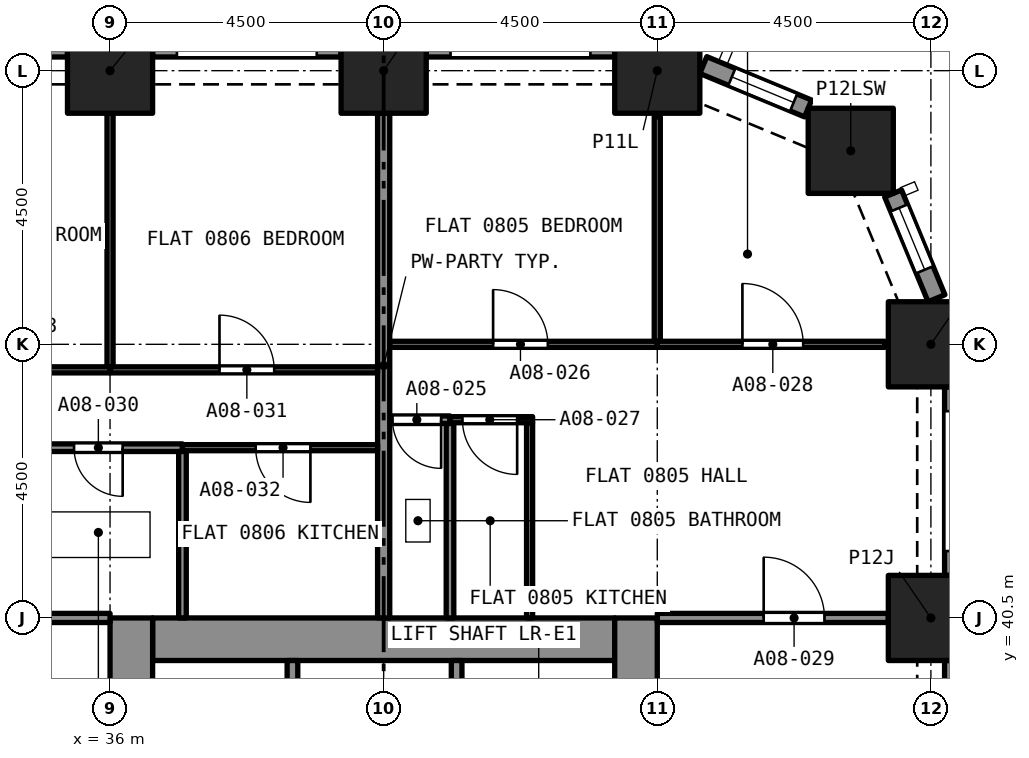
"""IFC4 building model, lengths in metres.
Left out: names, types, materials, properties, quantities, classifications, styles, units other than length and angle.
Written with IfcOpenShell. Run it as: python <this file> out.ifc"""

import sys

from ifc_helpers import new_model, si_unit, direction, frame, frame_2d, origin, origin_2d, place, context, subcontext, project, spatial, rectangle, extrude, element, fill, save


model = new_model("IFC4")
c1 = context("Model", 3, precision=1e-05, world=origin(), true_north=direction((0.0, 1.0)))
c2 = subcontext(c1, "Body", "Model", "MODEL_VIEW")
j1 = project(units=[si_unit("LENGTHUNIT", "METRE"), si_unit("PLANEANGLEUNIT", "RADIAN")], contexts=[c1])
p1 = place(None, origin())
s1 = spatial("IfcSite", under=j1, at=p1, CompositionType="ELEMENT")
p2 = place(p1, origin())
s2 = spatial("IfcBuilding", under=s1, at=p2, CompositionType="ELEMENT")
p3 = place(p2, frame((0.0, 0.0, 36.8)))
s3 = spatial("IfcBuildingStorey", under=s2, at=p3, CompositionType="ELEMENT", Elevation=36.8)
for number, where, z_axis, x_axis in (
    (1, (49.5, 40.5, 0.0), (0.0, 0.0, 1.0), (1.0, 0.0, 0.0)),
    (2, (49.5, 45.0, 0.0), (0.0, 0.0, 1.0), (1.0, 0.0, 0.0)),
    (3, (48.182, 48.182, 0.0), (0.0, 0.0, 1.0), (1.0, 0.0, 0.0)),
    (4, (36.0, 49.5, 0.0), (0.0, 0.0, 1.0), (1.0, 0.0, 0.0)),
    (5, (40.5, 49.5, 0.0), (0.0, 0.0, 1.0), (1.0, 0.0, 0.0)),
    (6, (45.0, 49.5, 0.0), (0.0, 0.0, 1.0), (1.0, 0.0, 0.0)),
):
    element("IfcColumn", number, at=place(p3, frame(where, z_axis=z_axis, x_axis=x_axis)), inside=s3, PredefinedType="COLUMN", context=c2, shape_type="SweptSolid", body=[
        extrude(rectangle(XDim=1.4, YDim=1.4, at=origin_2d()), origin(), (0.0, 0.0, 1.0), 3.2),
    ])
p4 = place(p3, frame((36.7, 40.15, 0.0), z_axis=(0.0, 0.0, 1.0), x_axis=(1.0, 0.0, 0.0)))
e7 = element("IfcWall", 7, at=p4, inside=s3, PredefinedType="SOLIDWALL", context=c2, shape_type="SweptSolid", body=[
    extrude(rectangle(XDim=7.6, YDim=0.7, at=frame_2d((3.8, 0.0))), origin(), (0.0, 0.0, 1.0), 3.2),
])
p5 = place(p3, frame((36.35, 27.0, 0.0), z_axis=(0.0, 0.0, 1.0), x_axis=(0.0, 1.0, 0.0)))
e8 = element("IfcWall", 8, at=p5, inside=s3, PredefinedType="SOLIDWALL", context=c2, shape_type="SweptSolid", body=[
    extrude(rectangle(XDim=13.5, YDim=0.7, at=frame_2d((6.75, 0.0))), origin(), (0.0, 0.0, 1.0), 3.2),
])
p6 = place(p5, frame((8.95, 0.0, 0.0)))
e9 = element("IfcOpeningElement", 9, at=p6, cuts=e8, PredefinedType="OPENING", context=c2, shape_type="SweptSolid", body=[
    extrude(rectangle(XDim=1.2, YDim=2.1, at=frame_2d((0.6, 1.05))), frame((0.0, 0.36, 0.0), z_axis=(0.0, -1.0, 0.0), x_axis=(1.0, 0.0, 0.0)), (0.0, 0.0, 1.0), 0.72),
])
p7 = place(p3, frame((44.65, 27.0, 0.0), z_axis=(0.0, 0.0, 1.0), x_axis=(0.0, 1.0, 0.0)))
e10 = element("IfcWall", 10, at=p7, inside=s3, PredefinedType="SOLIDWALL", context=c2, shape_type="SweptSolid", body=[
    extrude(rectangle(XDim=13.5, YDim=0.7, at=frame_2d((6.75, 0.0))), origin(), (0.0, 0.0, 1.0), 3.2),
])
p8 = place(p7, frame((8.95, 0.0, 0.0)))
e11 = element("IfcOpeningElement", 11, at=p8, cuts=e10, PredefinedType="OPENING", context=c2, shape_type="SweptSolid", body=[
    extrude(rectangle(XDim=1.2, YDim=2.1, at=frame_2d((0.6, 1.05))), frame((0.0, 0.36, 0.0), z_axis=(0.0, -1.0, 0.0), x_axis=(1.0, 0.0, 0.0)), (0.0, 0.0, 1.0), 0.72),
])
p9 = place(p3, frame((49.875, 39.8, 0.0), z_axis=(0.0, 0.0, 1.0), x_axis=(0.0, -1.0, 0.0)))
e12 = element("IfcWall", 12, at=p9, inside=s3, PredefinedType="SOLIDWALL", context=c2, shape_type="SweptSolid", body=[
    extrude(rectangle(XDim=3.1, YDim=0.3, at=frame_2d((1.55, 0.0))), origin(), (0.0, 0.0, 1.0), 3.2),
])
p10 = place(p9, frame((0.4, 0.0, 0.45)))
e13 = element("IfcOpeningElement", 13, at=p10, cuts=e12, PredefinedType="OPENING", context=c2, shape_type="SweptSolid", body=[
    extrude(rectangle(XDim=2.3, YDim=1.95, at=frame_2d((1.15, 0.975))), frame((0.0, 0.16, 0.0), z_axis=(0.0, -1.0, 0.0), x_axis=(1.0, 0.0, 0.0)), (0.0, 0.0, 1.0), 0.32),
])
p11 = place(p3, frame((49.875, 44.3, 0.0), z_axis=(0.0, 0.0, 1.0), x_axis=(0.0, -1.0, 0.0)))
e14 = element("IfcWall", 14, at=p11, inside=s3, PredefinedType="SOLIDWALL", context=c2, shape_type="SweptSolid", body=[
    extrude(rectangle(XDim=3.1, YDim=0.3, at=frame_2d((1.55, 0.0))), origin(), (0.0, 0.0, 1.0), 3.2),
])
p12 = place(p11, frame((0.4, 0.0, 0.45)))
e15 = element("IfcOpeningElement", 15, at=p12, cuts=e14, PredefinedType="OPENING", context=c2, shape_type="SweptSolid", body=[
    extrude(rectangle(XDim=2.3, YDim=1.95, at=frame_2d((1.15, 0.975))), frame((0.0, 0.16, 0.0), z_axis=(0.0, -1.0, 0.0), x_axis=(1.0, 0.0, 0.0)), (0.0, 0.0, 1.0), 0.32),
])
p13 = place(p3, frame((48.878, 47.48, 0.0), z_axis=(0.0, 0.0, 1.0), x_axis=(0.38262540684, -0.923903565336, 0.0)))
e16 = element("IfcWall", 16, at=p13, inside=s3, PredefinedType="SOLIDWALL", context=c2, shape_type="SweptSolid", body=[
    extrude(rectangle(XDim=1.865, YDim=0.3, at=frame_2d((0.933, 0.0))), origin(), (0.0, 0.0, 1.0), 3.2),
])
p14 = place(p13, frame((0.258, 0.0, 0.45)))
e17 = element("IfcOpeningElement", 17, at=p14, cuts=e16, PredefinedType="OPENING", context=c2, shape_type="SweptSolid", body=[
    extrude(rectangle(XDim=1.1, YDim=1.95, at=frame_2d((0.55, 0.975))), frame((0.0, 0.16, 0.0), z_axis=(0.0, -1.0, 0.0), x_axis=(1.0, 0.0, 0.0)), (0.0, 0.0, 1.0), 0.32),
])
p15 = place(p3, frame((45.757, 49.592, 0.0), z_axis=(0.0, 0.0, 1.0), x_axis=(0.923857286003, -0.382737135771, 0.0)))
e18 = element("IfcWall", 18, at=p15, inside=s3, PredefinedType="SOLIDWALL", context=c2, shape_type="SweptSolid", body=[
    extrude(rectangle(XDim=1.865, YDim=0.3, at=frame_2d((0.933, 0.0))), origin(), (0.0, 0.0, 1.0), 3.2),
])
p16 = place(p15, frame((0.508, 0.0, 0.45)))
e19 = element("IfcOpeningElement", 19, at=p16, cuts=e18, PredefinedType="OPENING", context=c2, shape_type="SweptSolid", body=[
    extrude(rectangle(XDim=1.1, YDim=1.95, at=frame_2d((0.55, 0.975))), frame((0.0, 0.16, 0.0), z_axis=(0.0, -1.0, 0.0), x_axis=(1.0, 0.0, 0.0)), (0.0, 0.0, 1.0), 0.32),
])
p17 = place(p3, frame((41.2, 49.875, 0.0), z_axis=(0.0, 0.0, 1.0), x_axis=(1.0, 0.0, 0.0)))
e20 = element("IfcWall", 20, at=p17, inside=s3, PredefinedType="SOLIDWALL", context=c2, shape_type="SweptSolid", body=[
    extrude(rectangle(XDim=3.1, YDim=0.3, at=frame_2d((1.55, 0.0))), origin(), (0.0, 0.0, 1.0), 3.2),
])
p18 = place(p17, frame((0.4, 0.0, 0.45)))
e21 = element("IfcOpeningElement", 21, at=p18, cuts=e20, PredefinedType="OPENING", context=c2, shape_type="SweptSolid", body=[
    extrude(rectangle(XDim=2.3, YDim=1.95, at=frame_2d((1.15, 0.975))), frame((0.0, 0.16, 0.0), z_axis=(0.0, -1.0, 0.0), x_axis=(1.0, 0.0, 0.0)), (0.0, 0.0, 1.0), 0.32),
])
p19 = place(p3, frame((36.7, 49.875, 0.0), z_axis=(0.0, 0.0, 1.0), x_axis=(1.0, 0.0, 0.0)))
e22 = element("IfcWall", 22, at=p19, inside=s3, PredefinedType="SOLIDWALL", context=c2, shape_type="SweptSolid", body=[
    extrude(rectangle(XDim=3.1, YDim=0.3, at=frame_2d((1.55, 0.0))), origin(), (0.0, 0.0, 1.0), 3.2),
])
p20 = place(p19, frame((0.4, 0.0, 0.45)))
e23 = element("IfcOpeningElement", 23, at=p20, cuts=e22, PredefinedType="OPENING", context=c2, shape_type="SweptSolid", body=[
    extrude(rectangle(XDim=2.3, YDim=1.95, at=frame_2d((1.15, 0.975))), frame((0.0, 0.16, 0.0), z_axis=(0.0, -1.0, 0.0), x_axis=(1.0, 0.0, 0.0)), (0.0, 0.0, 1.0), 0.32),
])
p21 = place(p3, frame((32.2, 49.875, 0.0), z_axis=(0.0, 0.0, 1.0), x_axis=(1.0, 0.0, 0.0)))
e24 = element("IfcWall", 24, at=p21, inside=s3, PredefinedType="SOLIDWALL", context=c2, shape_type="SweptSolid", body=[
    extrude(rectangle(XDim=3.1, YDim=0.3, at=frame_2d((1.55, 0.0))), origin(), (0.0, 0.0, 1.0), 3.2),
])
p22 = place(p21, frame((0.4, 0.0, 0.45)))
e25 = element("IfcOpeningElement", 25, at=p22, cuts=e24, PredefinedType="OPENING", context=c2, shape_type="SweptSolid", body=[
    extrude(rectangle(XDim=2.3, YDim=1.95, at=frame_2d((1.15, 0.975))), frame((0.0, 0.16, 0.0), z_axis=(0.0, -1.0, 0.0), x_axis=(1.0, 0.0, 0.0)), (0.0, 0.0, 1.0), 0.32),
])
p23 = place(p3, frame((41.591, 43.76, 0.0), z_axis=(0.0, 0.0, 1.0), x_axis=(-1.0, 0.0, 0.0)))
e26 = element("IfcWall", 26, at=p23, inside=s3, PredefinedType="PARTITIONING", context=c2, shape_type="SweptSolid", body=[
    extrude(rectangle(XDim=0.991, YDim=0.125, at=frame_2d((0.495, 0.0))), origin(), (0.0, 0.0, 1.0), 2.9),
])
p24 = place(p23, frame((0.146, 0.0, 0.0)))
e27 = element("IfcOpeningElement", 27, at=p24, cuts=e26, PredefinedType="OPENING", context=c2, shape_type="SweptSolid", body=[
    extrude(rectangle(XDim=0.8, YDim=2.1, at=frame_2d((0.4, 1.05))), frame((0.0, 0.073, 0.0), z_axis=(0.0, -1.0, 0.0), x_axis=(1.0, 0.0, 0.0)), (0.0, 0.0, 1.0), 0.145),
])
p25 = place(p3, frame((41.591, 40.5, 0.0), z_axis=(0.0, 0.0, 1.0), x_axis=(0.0, 1.0, 0.0)))
e28 = element("IfcWall", 28, at=p25, inside=s3, PredefinedType="PARTITIONING", context=c2, shape_type="SweptSolid", body=[
    extrude(rectangle(XDim=3.198, YDim=0.125, at=frame_2d((1.599, 0.0))), origin(), (0.0, 0.0, 1.0), 2.9),
])
p26 = place(p3, frame((40.5, 40.5, 0.0), z_axis=(0.0, 0.0, 1.0), x_axis=(0.0, 1.0, 0.0)))
e29 = element("IfcWall", 29, at=p26, inside=s3, PredefinedType="PARTITIONING", context=c2, shape_type="SweptSolid", body=[
    extrude(rectangle(XDim=8.3, YDim=0.2, at=frame_2d((4.15, 0.0))), origin(), (0.0, 0.0, 1.0), 2.9),
])
p27 = place(p3, frame((40.6, 45.0, 0.0), z_axis=(0.0, 0.0, 1.0), x_axis=(1.0, 0.0, 0.0)))
e30 = element("IfcWall", 30, at=p27, inside=s3, PredefinedType="PARTITIONING", context=c2, shape_type="SweptSolid", body=[
    extrude(rectangle(XDim=4.4, YDim=0.1, at=frame_2d((2.2, 0.0))), origin(), (0.0, 0.0, 1.0), 2.9),
])
p28 = place(p27, frame((1.7, 0.0, 0.0)))
e31 = element("IfcOpeningElement", 31, at=p28, cuts=e30, PredefinedType="OPENING", context=c2, shape_type="SweptSolid", body=[
    extrude(rectangle(XDim=0.9, YDim=2.1, at=frame_2d((0.45, 1.05))), frame((0.0, 0.06, 0.0), z_axis=(0.0, -1.0, 0.0), x_axis=(1.0, 0.0, 0.0)), (0.0, 0.0, 1.0), 0.12),
])
p29 = place(p3, frame((45.0, 45.05, 0.0), z_axis=(0.0, 0.0, 1.0), x_axis=(0.0, 1.0, 0.0)))
e32 = element("IfcWall", 32, at=p29, inside=s3, PredefinedType="PARTITIONING", context=c2, shape_type="SweptSolid", body=[
    extrude(rectangle(XDim=3.692, YDim=0.1, at=frame_2d((1.846, 0.0))), origin(), (0.0, 0.0, 1.0), 2.9),
])
p30 = place(p3, frame((42.9, 40.5, 0.0), z_axis=(0.0, 0.0, 1.0), x_axis=(0.0, 1.0, 0.0)))
e33 = element("IfcWall", 33, at=p30, inside=s3, PredefinedType="PARTITIONING", context=c2, shape_type="SweptSolid", body=[
    extrude(rectangle(XDim=3.21, YDim=0.1, at=frame_2d((1.605, 0.0))), origin(), (0.0, 0.0, 1.0), 2.9),
])
p31 = place(p3, frame((42.95, 43.76, 0.0), z_axis=(0.0, 0.0, 1.0), x_axis=(-1.0, 0.0, 0.0)))
e34 = element("IfcWall", 34, at=p31, inside=s3, PredefinedType="PARTITIONING", context=c2, shape_type="SweptSolid", body=[
    extrude(rectangle(XDim=1.359, YDim=0.1, at=frame_2d((0.68, 0.0))), origin(), (0.0, 0.0, 1.0), 2.9),
])
p32 = place(p31, frame((0.254, 0.0, 0.0)))
e35 = element("IfcOpeningElement", 35, at=p32, cuts=e34, PredefinedType="OPENING", context=c2, shape_type="SweptSolid", body=[
    extrude(rectangle(XDim=0.9, YDim=2.1, at=frame_2d((0.45, 1.05))), frame((0.0, 0.06, 0.0), z_axis=(0.0, -1.0, 0.0), x_axis=(1.0, 0.0, 0.0)), (0.0, 0.0, 1.0), 0.12),
])
p33 = place(p3, frame((45.0, 45.0, 0.0), z_axis=(0.0, 0.0, 1.0), x_axis=(1.0, 0.0, 0.0)))
e36 = element("IfcWall", 36, at=p33, inside=s3, PredefinedType="PARTITIONING", context=c2, shape_type="SweptSolid", body=[
    extrude(rectangle(XDim=3.742, YDim=0.1, at=frame_2d((1.871, 0.0))), origin(), (0.0, 0.0, 1.0), 2.9),
])
p34 = place(p33, frame((1.4, 0.0, 0.0)))
e37 = element("IfcOpeningElement", 37, at=p34, cuts=e36, PredefinedType="OPENING", context=c2, shape_type="SweptSolid", body=[
    extrude(rectangle(XDim=1.0, YDim=2.1, at=frame_2d((0.5, 1.05))), frame((0.0, 0.06, 0.0), z_axis=(0.0, -1.0, 0.0), x_axis=(1.0, 0.0, 0.0)), (0.0, 0.0, 1.0), 0.12),
])
p35 = place(p3, frame((45.0, 40.5, 0.0), z_axis=(0.0, 0.0, 1.0), x_axis=(1.0, 0.0, 0.0)))
e38 = element("IfcWall", 38, at=p35, inside=s3, PredefinedType="PARTITIONING", context=c2, shape_type="SweptSolid", body=[
    extrude(rectangle(XDim=3.8, YDim=0.15, at=frame_2d((1.9, 0.0))), origin(), (0.0, 0.0, 1.0), 2.9),
])
p36 = place(p35, frame((1.75, 0.0, 0.0)))
e39 = element("IfcOpeningElement", 39, at=p36, cuts=e38, PredefinedType="OPENING", context=c2, shape_type="SweptSolid", body=[
    extrude(rectangle(XDim=1.0, YDim=2.1, at=frame_2d((0.5, 1.05))), frame((0.0, 0.085, 0.0), z_axis=(0.0, -1.0, 0.0), x_axis=(1.0, 0.0, 0.0)), (0.0, 0.0, 1.0), 0.17),
])
p37 = place(p3, frame((37.19, 43.3, 0.0), z_axis=(0.0, 0.0, 1.0), x_axis=(-1.0, 0.0, 0.0)))
e40 = element("IfcWall", 40, at=p37, inside=s3, PredefinedType="PARTITIONING", context=c2, shape_type="SweptSolid", body=[
    extrude(rectangle(XDim=2.828, YDim=0.125, at=frame_2d((1.414, 0.0))), origin(), (0.0, 0.0, 1.0), 2.9),
])
p38 = place(p37, frame((0.983, 0.0, 0.0)))
e41 = element("IfcOpeningElement", 41, at=p38, cuts=e40, PredefinedType="OPENING", context=c2, shape_type="SweptSolid", body=[
    extrude(rectangle(XDim=0.8, YDim=2.1, at=frame_2d((0.4, 1.05))), frame((0.0, 0.073, 0.0), z_axis=(0.0, -1.0, 0.0), x_axis=(1.0, 0.0, 0.0)), (0.0, 0.0, 1.0), 0.145),
])
p39 = place(p3, frame((37.191, 40.5, 0.0), z_axis=(0.0, 0.0, 1.0), x_axis=(0.0, 1.0, 0.0)))
e42 = element("IfcWall", 42, at=p39, inside=s3, PredefinedType="PARTITIONING", context=c2, shape_type="SweptSolid", body=[
    extrude(rectangle(XDim=2.738, YDim=0.125, at=frame_2d((1.369, 0.0))), origin(), (0.0, 0.0, 1.0), 2.9),
])
p40 = place(p3, frame((34.425, 40.5, 0.0), z_axis=(0.0, 0.0, 1.0), x_axis=(1.0, 0.0, 0.0)))
e43 = element("IfcWall", 43, at=p40, inside=s3, PredefinedType="PARTITIONING", context=c2, shape_type="SweptSolid", body=[
    extrude(rectangle(XDim=1.575, YDim=0.15, at=frame_2d((0.788, 0.0))), origin(), (0.0, 0.0, 1.0), 2.9),
])
p41 = place(p3, frame((36.0, 44.58, 0.0), z_axis=(0.0, 0.0, 1.0), x_axis=(1.0, 0.0, 0.0)))
e44 = element("IfcWall", 44, at=p41, inside=s3, PredefinedType="PARTITIONING", context=c2, shape_type="SweptSolid", body=[
    extrude(rectangle(XDim=4.4, YDim=0.1, at=frame_2d((2.2, 0.0))), origin(), (0.0, 0.0, 1.0), 2.9),
])
p42 = place(p41, frame((1.8, 0.0, 0.0)))
e45 = element("IfcOpeningElement", 45, at=p42, cuts=e44, PredefinedType="OPENING", context=c2, shape_type="SweptSolid", body=[
    extrude(rectangle(XDim=0.9, YDim=2.1, at=frame_2d((0.45, 1.05))), frame((0.0, 0.06, 0.0), z_axis=(0.0, -1.0, 0.0), x_axis=(1.0, 0.0, 0.0)), (0.0, 0.0, 1.0), 0.12),
])
p43 = place(p3, frame((36.0, 44.63, 0.0), z_axis=(0.0, 0.0, 1.0), x_axis=(0.0, 1.0, 0.0)))
e46 = element("IfcWall", 46, at=p43, inside=s3, PredefinedType="PARTITIONING", context=c2, shape_type="SweptSolid", body=[
    extrude(rectangle(XDim=4.17, YDim=0.1, at=frame_2d((2.085, 0.0))), origin(), (0.0, 0.0, 1.0), 2.9),
])
p44 = place(p3, frame((40.4, 43.3, 0.0), z_axis=(0.0, 0.0, 1.0), x_axis=(-1.0, 0.0, 0.0)))
e47 = element("IfcWall", 47, at=p44, inside=s3, PredefinedType="PARTITIONING", context=c2, shape_type="SweptSolid", body=[
    extrude(rectangle(XDim=3.209, YDim=0.1, at=frame_2d((1.605, 0.0))), origin(), (0.0, 0.0, 1.0), 2.9),
])
p45 = place(p44, frame((1.105, 0.0, 0.0)))
e48 = element("IfcOpeningElement", 48, at=p45, cuts=e47, PredefinedType="OPENING", context=c2, shape_type="SweptSolid", body=[
    extrude(rectangle(XDim=0.9, YDim=2.1, at=frame_2d((0.45, 1.05))), frame((0.0, 0.06, 0.0), z_axis=(0.0, -1.0, 0.0), x_axis=(1.0, 0.0, 0.0)), (0.0, 0.0, 1.0), 0.12),
])
p46 = place(p3, frame((32.2, 44.58, 0.0), z_axis=(0.0, 0.0, 1.0), x_axis=(1.0, 0.0, 0.0)))
e49 = element("IfcWall", 49, at=p46, inside=s3, PredefinedType="PARTITIONING", context=c2, shape_type="SweptSolid", body=[
    extrude(rectangle(XDim=3.8, YDim=0.1, at=frame_2d((1.9, 0.0))), origin(), (0.0, 0.0, 1.0), 2.9),
])
p47 = place(p46, frame((1.05, 0.0, 0.0)))
e50 = element("IfcOpeningElement", 50, at=p47, cuts=e49, PredefinedType="OPENING", context=c2, shape_type="SweptSolid", body=[
    extrude(rectangle(XDim=1.0, YDim=2.1, at=frame_2d((0.5, 1.05))), frame((0.0, 0.06, 0.0), z_axis=(0.0, -1.0, 0.0), x_axis=(1.0, 0.0, 0.0)), (0.0, 0.0, 1.0), 0.12),
])
for number, where, z_axis, x_axis in (
    (51, (41.7, 37.5, 0.0), (0.0, 0.0, 1.0), (0.0, 1.0, 0.0)),
    (52, (39.0, 37.5, 0.0), (0.0, 0.0, 1.0), (0.0, 1.0, 0.0)),
):
    element("IfcWall", number, at=place(p3, frame(where, z_axis=z_axis, x_axis=x_axis)), inside=s3, PredefinedType="SOLIDWALL", context=c2, shape_type="SweptSolid", body=[
        extrude(rectangle(XDim=2.3, YDim=0.175, at=frame_2d((1.15, 0.0))), origin(), (0.0, 0.0, 1.0), 2.9),
    ])
p48 = place(p14, origin())
e53 = element("IfcWindow", 53, at=p48, inside=s3, PartitioningType="SINGLE_PANEL", PredefinedType="WINDOW", context=c2, shape_type="SweptSolid", body=[
    extrude(rectangle(XDim=1.1, YDim=1.95, at=frame_2d((0.55, 0.975))), frame((0.0, 0.03, 0.0), z_axis=(0.0, -1.0, 0.0), x_axis=(1.0, 0.0, 0.0)), (0.0, 0.0, 1.0), 0.06),
])
fill(e17, e53)
p49 = place(p16, origin())
e54 = element("IfcWindow", 54, at=p49, inside=s3, PartitioningType="SINGLE_PANEL", PredefinedType="WINDOW", context=c2, shape_type="SweptSolid", body=[
    extrude(rectangle(XDim=1.1, YDim=1.95, at=frame_2d((0.55, 0.975))), frame((0.0, 0.03, 0.0), z_axis=(0.0, -1.0, 0.0), x_axis=(1.0, 0.0, 0.0)), (0.0, 0.0, 1.0), 0.06),
])
fill(e19, e54)
p50 = place(p24, origin())
e55 = element("IfcDoor", 55, at=p50, inside=s3, OperationType="SINGLE_SWING_RIGHT", PredefinedType="DOOR", context=c2, shape_type="SweptSolid", body=[
    extrude(rectangle(XDim=0.8, YDim=2.1, at=frame_2d((0.4, 1.05))), frame((0.0, 0.025, 0.0), z_axis=(0.0, -1.0, 0.0), x_axis=(1.0, 0.0, 0.0)), (0.0, 0.0, 1.0), 0.05),
])
fill(e27, e55)
p51 = place(p28, origin())
e56 = element("IfcDoor", 56, at=p51, inside=s3, OperationType="SINGLE_SWING_LEFT", PredefinedType="DOOR", context=c2, shape_type="SweptSolid", body=[
    extrude(rectangle(XDim=0.9, YDim=2.1, at=frame_2d((0.45, 1.05))), frame((0.0, 0.025, 0.0), z_axis=(0.0, -1.0, 0.0), x_axis=(1.0, 0.0, 0.0)), (0.0, 0.0, 1.0), 0.05),
])
fill(e31, e56)
p52 = place(p32, origin())
e57 = element("IfcDoor", 57, at=p52, inside=s3, OperationType="SINGLE_SWING_RIGHT", PredefinedType="DOOR", context=c2, shape_type="SweptSolid", body=[
    extrude(rectangle(XDim=0.9, YDim=2.1, at=frame_2d((0.45, 1.05))), frame((0.0, 0.025, 0.0), z_axis=(0.0, -1.0, 0.0), x_axis=(1.0, 0.0, 0.0)), (0.0, 0.0, 1.0), 0.05),
])
fill(e35, e57)
p53 = place(p34, origin())
e58 = element("IfcDoor", 58, at=p53, inside=s3, OperationType="SINGLE_SWING_RIGHT", PredefinedType="DOOR", context=c2, shape_type="SweptSolid", body=[
    extrude(rectangle(XDim=1.0, YDim=2.1, at=frame_2d((0.5, 1.05))), frame((0.0, 0.025, 0.0), z_axis=(0.0, -1.0, 0.0), x_axis=(1.0, 0.0, 0.0)), (0.0, 0.0, 1.0), 0.05),
])
fill(e37, e58)
p54 = place(p36, origin())
e59 = element("IfcDoor", 59, at=p54, inside=s3, OperationType="SINGLE_SWING_RIGHT", PredefinedType="DOOR", context=c2, shape_type="SweptSolid", body=[
    extrude(rectangle(XDim=1.0, YDim=2.1, at=frame_2d((0.5, 1.05))), frame((0.0, 0.025, 0.0), z_axis=(0.0, -1.0, 0.0), x_axis=(1.0, 0.0, 0.0)), (0.0, 0.0, 1.0), 0.05),
])
fill(e39, e59)
p55 = place(p38, origin())
e60 = element("IfcDoor", 60, at=p55, inside=s3, OperationType="SINGLE_SWING_LEFT", PredefinedType="DOOR", context=c2, shape_type="SweptSolid", body=[
    extrude(rectangle(XDim=0.8, YDim=2.1, at=frame_2d((0.4, 1.05))), frame((0.0, 0.025, 0.0), z_axis=(0.0, -1.0, 0.0), x_axis=(1.0, 0.0, 0.0)), (0.0, 0.0, 1.0), 0.05),
])
fill(e41, e60)
p56 = place(p42, origin())
e61 = element("IfcDoor", 61, at=p56, inside=s3, OperationType="SINGLE_SWING_RIGHT", PredefinedType="DOOR", context=c2, shape_type="SweptSolid", body=[
    extrude(rectangle(XDim=0.9, YDim=2.1, at=frame_2d((0.45, 1.05))), frame((0.0, 0.025, 0.0), z_axis=(0.0, -1.0, 0.0), x_axis=(1.0, 0.0, 0.0)), (0.0, 0.0, 1.0), 0.05),
])
fill(e45, e61)
p57 = place(p45, origin())
e62 = element("IfcDoor", 62, at=p57, inside=s3, OperationType="SINGLE_SWING_LEFT", PredefinedType="DOOR", context=c2, shape_type="SweptSolid", body=[
    extrude(rectangle(XDim=0.9, YDim=2.1, at=frame_2d((0.45, 1.05))), frame((0.0, 0.025, 0.0), z_axis=(0.0, -1.0, 0.0), x_axis=(1.0, 0.0, 0.0)), (0.0, 0.0, 1.0), 0.05),
])
fill(e48, e62)
save(model, sys.argv[1])
